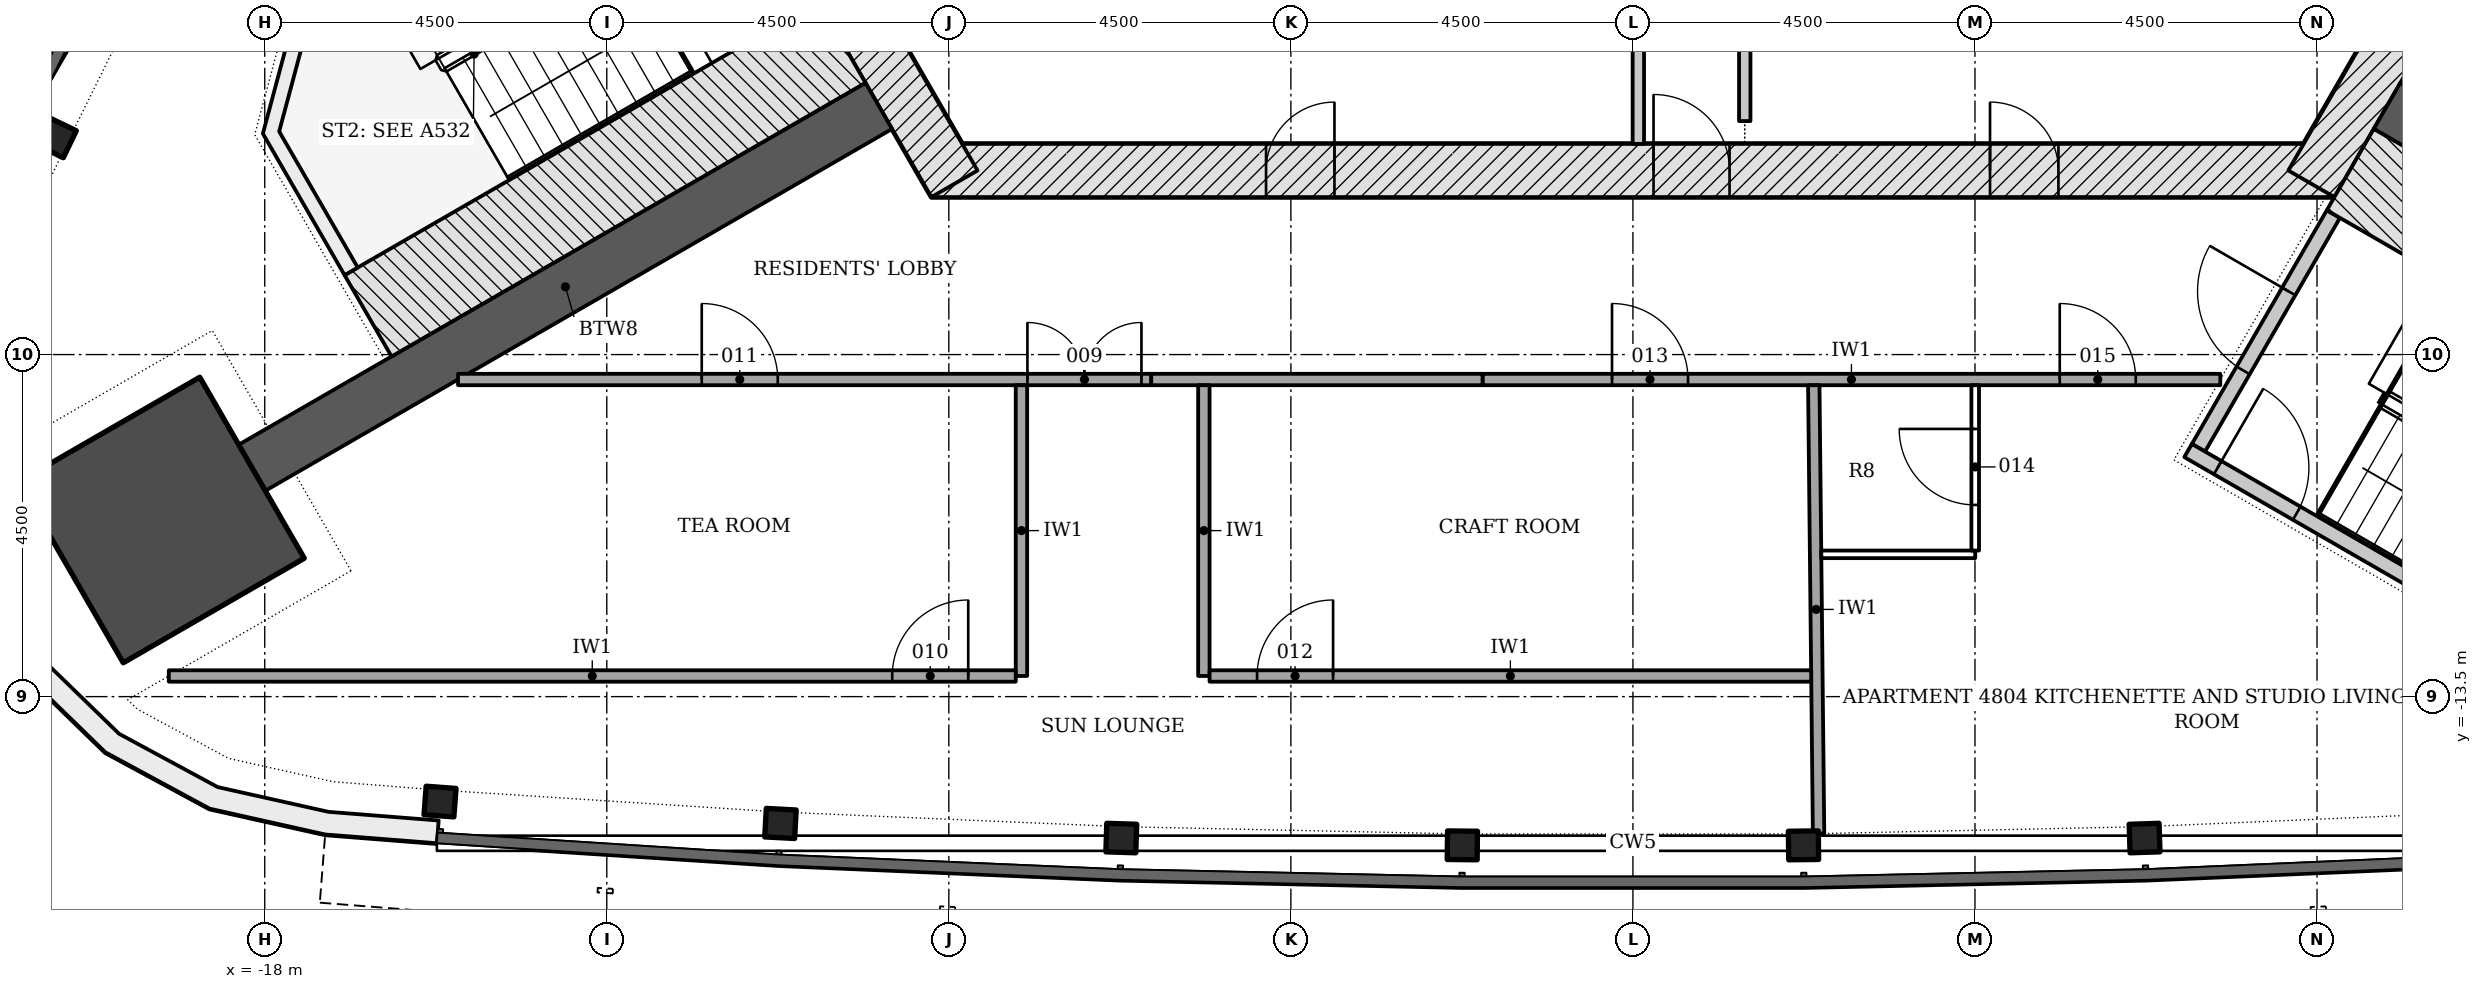
"""IFC4 building model, lengths in metres.
Left out: names, types, materials, properties, quantities, classifications, styles, units other than length and angle.
Written with IfcOpenShell. Run it as: python <this file> out.ifc"""

import sys

from ifc_helpers import new_model, si_unit, direction, frame, frame_2d, origin, origin_2d, place, context, subcontext, project, spatial, polyline, rectangle, i_section, outline, extrude, element, fill, save


model = new_model("IFC4")
c1 = context("Model", 3, precision=1e-05, world=origin(), true_north=direction((0.0, 1.0)))
c2 = subcontext(c1, "Body", "Model", "MODEL_VIEW")
j1 = project(units=[si_unit("LENGTHUNIT", "METRE"), si_unit("PLANEANGLEUNIT", "RADIAN")], contexts=[c1])
p1 = place(None, origin())
s1 = spatial("IfcSite", under=j1, at=p1, CompositionType="ELEMENT")
p2 = place(p1, origin())
s2 = spatial("IfcBuilding", under=s1, at=p2, CompositionType="ELEMENT")
p3 = place(p2, frame((0.0, 0.0, 188.7)))
s3 = spatial("IfcBuildingStorey", under=s2, at=p3, CompositionType="ELEMENT", Elevation=188.7)
p4 = place(p3, frame((-9.229, -6.578, -0.2), z_axis=(0.0, 0.0, 1.0), x_axis=(1.0, 0.0, 0.0)))
e1 = element("IfcWall", 1, at=p4, inside=s3, PredefinedType="SHEAR", context=c2, shape_type="SweptSolid", body=[
    extrude(rectangle(XDim=18.458, YDim=0.7, at=frame_2d((9.229, 0.0))), origin(), (0.0, 0.0, 1.0), 3.6),
])
p5 = place(p4, frame((9.5, 0.0, 0.2)))
e2 = element("IfcOpeningElement", 2, at=p5, cuts=e1, PredefinedType="OPENING", context=c2, shape_type="SweptSolid", body=[
    extrude(rectangle(XDim=1.0, YDim=2.1, at=frame_2d((0.5, 1.05))), frame((0.0, 0.36, 0.0), z_axis=(0.0, -1.0, 0.0), x_axis=(1.0, 0.0, 0.0)), (0.0, 0.0, 1.0), 0.72),
])
p6 = place(p4, frame((4.402, 0.0, 0.2)))
e3 = element("IfcOpeningElement", 3, at=p6, cuts=e1, PredefinedType="OPENING", context=c2, shape_type="SweptSolid", body=[
    extrude(rectangle(XDim=0.9, YDim=2.1, at=frame_2d((0.45, 1.05))), frame((0.0, 0.36, 0.0), z_axis=(0.0, -1.0, 0.0), x_axis=(1.0, 0.0, 0.0)), (0.0, 0.0, 1.0), 0.72),
])
p7 = place(p4, frame((13.927, 0.0, 0.2)))
e4 = element("IfcOpeningElement", 4, at=p7, cuts=e1, PredefinedType="OPENING", context=c2, shape_type="SweptSolid", body=[
    extrude(rectangle(XDim=0.9, YDim=2.1, at=frame_2d((0.45, 1.05))), frame((0.0, 0.36, 0.0), z_axis=(0.0, -1.0, 0.0), x_axis=(1.0, 0.0, 0.0)), (0.0, 0.0, 1.0), 0.72),
])
for number, where, z_axis, x_axis in (
    (5, (8.926, -6.753, -0.2), (0.0, 0.0, 1.0), (0.5, 0.866, 0.0)),
    (6, (-10.311, -4.353, -0.2), (0.0, 0.0, 1.0), (0.5, -0.866, 0.0)),
):
    element("IfcWall", number, at=place(p3, frame(where, z_axis=z_axis, x_axis=x_axis)), inside=s3, PredefinedType="SHEAR", context=c2, shape_type="SweptSolid", body=[
        extrude(rectangle(XDim=2.771, YDim=0.7, at=frame_2d((1.386, 0.0))), origin(), (0.0, 0.0, 1.0), 3.6),
    ])
for number, where, z_axis, x_axis in (
    (7, (-9.922, -5.728, -0.2), (0.0, 0.0, 1.0), (-0.866, -0.5, 0.0)),
    (8, (9.922, -5.728, -0.2), (0.0, 0.0, 1.0), (0.866, -0.5, 0.0)),
):
    element("IfcWall", number, at=place(p3, frame(where, z_axis=z_axis, x_axis=x_axis)), inside=s3, PredefinedType="SHEAR", context=c2, shape_type="SweptSolid", body=[
        extrude(rectangle(XDim=9.521, YDim=0.7, at=frame_2d((4.761, 0.0))), origin(), (0.0, 0.0, 1.0), 3.6),
    ])
p8 = place(p3, frame((-19.358, -11.177, -0.2), z_axis=(0.0, 0.0, 1.0), x_axis=(-0.866025403784, -0.5, 0.0)))
e9 = element("IfcColumn", 9, at=p8, inside=s3, PredefinedType="COLUMN", context=c2, shape_type="SweptSolid", body=[
    extrude(rectangle(XDim=2.75, YDim=2.75, at=origin_2d()), origin(), (0.0, 0.0, 1.0), 3.6),
])
for number, where, z_axis, x_axis in (
    (10, (-20.734, -6.151, -0.2), (0.0, 0.0, 1.0), (-0.434, -0.901, 0.0)),
    (11, (-15.694, -14.881, -0.2), (0.0, 0.0, 1.0), (0.997, -0.075, 0.0)),
    (12, (-11.215, -15.169, -0.2), (0.0, 0.0, 1.0), (0.999, -0.053, 0.0)),
    (13, (-6.731, -15.361, -0.2), (0.0, 0.0, 1.0), (0.999, -0.032, 0.0)),
    (14, (-2.244, -15.457, -0.2), (0.0, 0.0, 1.0), (1.0, -0.011, 0.0)),
    (15, (2.244, -15.457, -0.2), (0.0, 0.0, 1.0), (1.0, 0.011, 0.0)),
    (16, (6.731, -15.361, -0.2), (0.0, 0.0, 1.0), (0.999, 0.032, 0.0)),
):
    element("IfcColumn", number, at=place(p3, frame(where, z_axis=z_axis, x_axis=x_axis)), inside=s3, PredefinedType="COLUMN", context=c2, shape_type="SweptSolid", body=[
        extrude(i_section(OverallWidth=0.394, OverallDepth=0.376, WebThickness=0.017, FlangeThickness=0.028, FilletRadius=0.015, at=origin_2d()), origin(), (0.0, 0.0, 1.0), 3.6),
    ])
p9 = place(p3, origin())
e17 = element("IfcWall", 17, at=p9, inside=s3, PredefinedType="NOTDEFINED", context=c2, shape_type="SweptSolid", body=[
    extrude(outline(polyline([(-21.229, -5.913), (-21.865, -7.243), (-22.33, -8.73), (-22.374, -10.287), (-21.992, -11.798), (-21.213, -13.147), (-20.096, -14.233), (-18.726, -14.974), (-17.205, -15.313), (-15.735, -15.429), (-15.712, -15.13), (-17.16, -15.016), (-18.619, -14.69), (-19.917, -13.989), (-20.974, -12.961), (-21.711, -11.684), (-22.073, -10.254), (-22.032, -8.78), (-21.584, -7.353), (-20.959, -6.042), (-21.229, -5.913)])), origin(), (0.0, 0.0, 1.0), 3.3),
])
p10 = place(p3, frame((0.071, 4.272, 0.0), z_axis=(0.0, 0.0, 1.0), x_axis=(0.0, -1.0, 0.0)))
e18 = element("IfcWall", 18, at=p10, inside=s3, PredefinedType="PARTITIONING", context=c2, shape_type="SweptSolid", body=[
    extrude(rectangle(XDim=10.5, YDim=0.15, at=frame_2d((5.25, 0.0))), origin(), (0.0, 0.0, 1.0), 3.4),
])
p11 = place(p10, frame((3.101, 0.0, 0.0)))
e19 = element("IfcOpeningElement", 19, at=p11, cuts=e18, PredefinedType="OPENING", context=c2, shape_type="SweptSolid", body=[
    extrude(rectangle(XDim=0.9, YDim=2.1, at=frame_2d((0.45, 1.05))), frame((0.0, 0.085, 0.0), z_axis=(0.0, -1.0, 0.0), x_axis=(1.0, 0.0, 0.0)), (0.0, 0.0, 1.0), 0.17),
])
p12 = place(p3, frame((1.471, -5.928, 0.0), z_axis=(0.0, 0.0, 1.0), x_axis=(0.0, 1.0, 0.0)))
e20 = element("IfcWall", 20, at=p12, inside=s3, PredefinedType="PARTITIONING", context=c2, shape_type="SweptSolid", body=[
    extrude(rectangle(XDim=10.206, YDim=0.15, at=frame_2d((5.103, 0.0))), origin(), (0.0, 0.0, 1.0), 3.4),
])
p13 = place(p12, frame((6.15, 0.0, 0.0)))
e21 = element("IfcOpeningElement", 21, at=p13, cuts=e20, PredefinedType="OPENING", context=c2, shape_type="SweptSolid", body=[
    extrude(rectangle(XDim=1.0, YDim=2.1, at=frame_2d((0.5, 1.05))), frame((0.0, 0.085, 0.0), z_axis=(0.0, -1.0, 0.0), x_axis=(1.0, 0.0, 0.0)), (0.0, 0.0, 1.0), 0.17),
])
p14 = place(p3, frame((-10.406, -4.89, -0.2), z_axis=(0.0, 0.0, 1.0), x_axis=(-0.866018442252, -0.500012057535, 0.0)))
e22 = element("IfcWall", 22, at=p14, inside=s3, PredefinedType="SHEAR", context=c2, shape_type="SweptSolid", body=[
    extrude(rectangle(XDim=7.2, YDim=1.236, at=frame_2d((3.6, 0.0))), origin(), (0.0, 0.0, 1.0), 3.6),
])
p15 = place(p3, frame((0.0, 0.0, -0.2)))
e23 = element("IfcWall", 23, at=p15, inside=s3, PredefinedType="SHEAR", context=c2, shape_type="SweptSolid", body=[
    extrude(outline(polyline([(-17.439, -3.907), (-18.025, -6.093), (-16.95, -7.955), (-16.777, -7.855), (-17.81, -6.065), (-17.267, -4.039), (-17.339, -4.081), (-17.339, -4.081), (-17.339, -4.081), (-17.339, -4.081), (-17.339, -4.081), (-17.339, -4.081), (-17.339, -4.081), (-17.339, -4.081), (-17.339, -4.081), (-17.339, -4.081), (-17.339, -4.081), (-17.339, -4.081), (-17.339, -4.081), (-17.339, -4.081), (-17.339, -4.081), (-17.339, -4.081), (-17.339, -4.081), (-17.439, -3.907)])), origin(), (0.0, 0.0, 1.0), 3.6),
])
p16 = place(p3, frame((7.44, -10.226, -0.2), z_axis=(0.0, 0.0, 1.0), x_axis=(0.500022077904, 0.866012656725, 0.0)))
e24 = element("IfcWall", 24, at=p16, inside=s3, PredefinedType="SHEAR", context=c2, shape_type="SweptSolid", body=[
    extrude(rectangle(XDim=3.55, YDim=0.2, at=frame_2d((1.775, 0.0))), origin(), (0.0, 0.0, 1.0), 3.6),
])
p17 = place(p16, frame((1.175, 0.0, 0.2)))
e25 = element("IfcOpeningElement", 25, at=p17, cuts=e24, PredefinedType="OPENING", context=c2, shape_type="SweptSolid", body=[
    extrude(rectangle(XDim=1.2, YDim=2.1, at=frame_2d((0.6, 1.05))), frame((0.0, 0.11, 0.0), z_axis=(0.0, -1.0, 0.0), x_axis=(1.0, 0.0, 0.0)), (0.0, 0.0, 1.0), 0.22),
])
p18 = place(p3, frame((7.304, -10.262, -0.2), z_axis=(0.0, 0.0, 1.0), x_axis=(0.866026594901, -0.49999793692, 0.0)))
e26 = element("IfcWall", 26, at=p18, inside=s3, PredefinedType="SHEAR", context=c2, shape_type="SweptSolid", body=[
    extrude(rectangle(XDim=5.6, YDim=0.2, at=frame_2d((2.8, 0.0))), origin(), (0.0, 0.0, 1.0), 3.6),
])
p19 = place(p18, frame((0.45, 0.0, 0.2)))
e27 = element("IfcOpeningElement", 27, at=p19, cuts=e26, PredefinedType="OPENING", context=c2, shape_type="SweptSolid", body=[
    extrude(rectangle(XDim=1.2, YDim=2.1, at=frame_2d((0.6, 1.05))), frame((0.0, 0.11, 0.0), z_axis=(0.0, -1.0, 0.0), x_axis=(1.0, 0.0, 0.0)), (0.0, 0.0, 1.0), 0.22),
])
p20 = place(p3, frame((9.438, -6.566, -0.2), z_axis=(0.0, 0.0, 1.0), x_axis=(0.866026919366, -0.499997374926, 0.0)))
e28 = element("IfcWall", 28, at=p20, inside=s3, PredefinedType="SHEAR", context=c2, shape_type="SweptSolid", body=[
    extrude(rectangle(XDim=7.2, YDim=1.236, at=frame_2d((3.6, 0.0))), origin(), (0.0, 0.0, 1.0), 3.6),
])
p21 = place(p3, frame((-15.457, -9.328, 0.0), z_axis=(0.0, 0.0, 1.0), x_axis=(1.0, 0.0, 0.0)))
e29 = element("IfcWall", 29, at=p21, inside=s3, PredefinedType="PARTITIONING", context=c2, shape_type="SweptSolid", body=[
    extrude(rectangle(XDim=9.12, YDim=0.15, at=frame_2d((4.56, 0.0))), origin(), (0.0, 0.0, 1.0), 2.852),
])
p22 = place(p21, frame((7.491, 0.0, 0.0)))
e30 = element("IfcOpeningElement", 30, at=p22, cuts=e29, PredefinedType="OPENING", context=c2, shape_type="SweptSolid", body=[
    extrude(rectangle(XDim=1.5, YDim=2.1, at=frame_2d((0.75, 1.05))), frame((0.0, 0.085, 0.0), z_axis=(0.0, -1.0, 0.0), x_axis=(1.0, 0.0, 0.0)), (0.0, 0.0, 1.0), 0.17),
])
p23 = place(p21, frame((3.206, 0.0, 0.0)))
e31 = element("IfcOpeningElement", 31, at=p23, cuts=e29, PredefinedType="OPENING", context=c2, shape_type="SweptSolid", body=[
    extrude(rectangle(XDim=1.0, YDim=2.1, at=frame_2d((0.5, 1.05))), frame((0.0, 0.085, 0.0), z_axis=(0.0, -1.0, 0.0), x_axis=(1.0, 0.0, 0.0)), (0.0, 0.0, 1.0), 0.17),
])
p24 = place(p3, frame((-1.979, -9.328, 0.0), z_axis=(0.0, 0.0, 1.0), x_axis=(1.0, 0.0, 0.0)))
e32 = element("IfcWall", 32, at=p24, inside=s3, PredefinedType="PARTITIONING", context=c2, shape_type="SweptSolid", body=[
    extrude(rectangle(XDim=9.706, YDim=0.15, at=frame_2d((4.853, 0.0))), origin(), (0.0, 0.0, 1.0), 2.852),
])
p25 = place(p24, frame((1.703, 0.0, 0.0)))
e33 = element("IfcOpeningElement", 33, at=p25, cuts=e32, PredefinedType="OPENING", context=c2, shape_type="SweptSolid", body=[
    extrude(rectangle(XDim=1.0, YDim=2.1, at=frame_2d((0.5, 1.05))), frame((0.0, 0.085, 0.0), z_axis=(0.0, -1.0, 0.0), x_axis=(1.0, 0.0, 0.0)), (0.0, 0.0, 1.0), 0.17),
])
p26 = place(p24, frame((7.594, 0.0, 0.0)))
e34 = element("IfcOpeningElement", 34, at=p26, cuts=e32, PredefinedType="OPENING", context=c2, shape_type="SweptSolid", body=[
    extrude(rectangle(XDim=1.0, YDim=2.1, at=frame_2d((0.5, 1.05))), frame((0.0, 0.085, 0.0), z_axis=(0.0, -1.0, 0.0), x_axis=(1.0, 0.0, 0.0)), (0.0, 0.0, 1.0), 0.17),
])
p27 = place(p3, frame((-6.337, -9.328, 0.0), z_axis=(0.0, 0.0, 1.0), x_axis=(1.0, 0.0, 0.0)))
e35 = element("IfcWall", 35, at=p27, inside=s3, PredefinedType="PARTITIONING", context=c2, shape_type="SweptSolid", body=[
    extrude(rectangle(XDim=4.359, YDim=0.15, at=frame_2d((2.179, 0.0))), origin(), (0.0, 0.0, 1.0), 2.852),
])
p28 = place(p3, frame((2.442, -15.302, 0.0), z_axis=(0.0, 0.0, 1.0), x_axis=(-0.01067687349, 0.999943000562, 0.0)))
e36 = element("IfcWall", 36, at=p28, inside=s3, PredefinedType="PARTITIONING", context=c2, shape_type="SweptSolid", body=[
    extrude(rectangle(XDim=5.899, YDim=0.15, at=frame_2d((2.95, 0.0))), origin(), (0.0, 0.0, 1.0), 2.461),
])
for number, where, z_axis, x_axis in (
    (37, (-8.045, -9.403, 0.0), (0.0, 0.0, 1.0), (0.0, -1.0, 0.0)),
    (38, (-5.645, -9.403, 0.0), (0.0, 0.0, 1.0), (0.0, -1.0, 0.0)),
):
    element("IfcWall", number, at=place(p3, frame(where, z_axis=z_axis, x_axis=x_axis)), inside=s3, PredefinedType="PARTITIONING", context=c2, shape_type="SweptSolid", body=[
        extrude(rectangle(XDim=3.825, YDim=0.15, at=frame_2d((1.913, 0.0))), origin(), (0.0, 0.0, 1.0), 3.4),
    ])
p29 = place(p3, frame((-19.262, -13.229, 0.0), z_axis=(0.0, 0.0, 1.0), x_axis=(1.0, 0.0, 0.0)))
e39 = element("IfcWall", 39, at=p29, inside=s3, PredefinedType="PARTITIONING", context=c2, shape_type="SweptSolid", body=[
    extrude(rectangle(XDim=11.143, YDim=0.15, at=frame_2d((5.571, 0.0))), origin(), (0.0, 0.0, 1.0), 2.852),
])
p30 = place(p29, frame((9.518, 0.0, 0.0)))
e40 = element("IfcOpeningElement", 40, at=p30, cuts=e39, PredefinedType="OPENING", context=c2, shape_type="SweptSolid", body=[
    extrude(rectangle(XDim=1.0, YDim=2.1, at=frame_2d((0.5, 1.05))), frame((0.0, 0.085, 0.0), z_axis=(0.0, -1.0, 0.0), x_axis=(1.0, 0.0, 0.0)), (0.0, 0.0, 1.0), 0.17),
])
p31 = place(p3, frame((-5.57, -13.229, 0.0), z_axis=(0.0, 0.0, 1.0), x_axis=(1.0, 0.0, 0.0)))
e41 = element("IfcWall", 41, at=p31, inside=s3, PredefinedType="PARTITIONING", context=c2, shape_type="SweptSolid", body=[
    extrude(rectangle(XDim=7.915, YDim=0.15, at=frame_2d((3.958, 0.0))), origin(), (0.0, 0.0, 1.0), 2.852),
])
p32 = place(p31, frame((0.625, 0.0, 0.0)))
e42 = element("IfcOpeningElement", 42, at=p32, cuts=e41, PredefinedType="OPENING", context=c2, shape_type="SweptSolid", body=[
    extrude(rectangle(XDim=1.0, YDim=2.1, at=frame_2d((0.5, 1.05))), frame((0.0, 0.085, 0.0), z_axis=(0.0, -1.0, 0.0), x_axis=(1.0, 0.0, 0.0)), (0.0, 0.0, 1.0), 0.17),
])
p33 = place(p3, frame((2.478, -11.628, 0.0), z_axis=(0.0, 0.0, 1.0), x_axis=(1.0, 0.0, 0.0)))
e43 = element("IfcWall", 43, at=p33, inside=s3, PredefinedType="PARTITIONING", context=c2, shape_type="SweptSolid", body=[
    extrude(rectangle(XDim=2.025, YDim=0.1, at=frame_2d((1.013, 0.0))), origin(), (0.0, 0.0, 1.0), 2.852),
])
p34 = place(p3, frame((4.503, -11.578, 0.0), z_axis=(0.0, 0.0, 1.0), x_axis=(0.0, 1.0, 0.0)))
e44 = element("IfcWall", 44, at=p34, inside=s3, PredefinedType="PARTITIONING", context=c2, shape_type="SweptSolid", body=[
    extrude(rectangle(XDim=2.175, YDim=0.1, at=frame_2d((1.087, 0.0))), origin(), (0.0, 0.0, 1.0), 2.852),
])
p35 = place(p34, frame((0.6, 0.0, 0.0)))
e45 = element("IfcOpeningElement", 45, at=p35, cuts=e44, PredefinedType="OPENING", context=c2, shape_type="SweptSolid", body=[
    extrude(rectangle(XDim=1.0, YDim=2.1, at=frame_2d((0.5, 1.05))), frame((0.0, 0.06, 0.0), z_axis=(0.0, -1.0, 0.0), x_axis=(1.0, 0.0, 0.0)), (0.0, 0.0, 1.0), 0.12),
])
p36 = place(p5, origin())
e46 = element("IfcDoor", 46, at=p36, inside=s3, OperationType="SINGLE_SWING_LEFT", PredefinedType="DOOR", context=c2, shape_type="SweptSolid", body=[
    extrude(rectangle(XDim=1.0, YDim=2.1, at=frame_2d((0.5, 1.05))), frame((0.0, 0.075, 0.0), z_axis=(0.0, -1.0, 0.0), x_axis=(1.0, 0.0, 0.0)), (0.0, 0.0, 1.0), 0.15),
])
fill(e2, e46)
p37 = place(p6, origin())
e47 = element("IfcDoor", 47, at=p37, inside=s3, OperationType="SINGLE_SWING_RIGHT", PredefinedType="DOOR", context=c2, shape_type="SweptSolid", body=[
    extrude(rectangle(XDim=0.9, YDim=2.1, at=frame_2d((0.45, 1.05))), frame((0.0, 0.075, 0.0), z_axis=(0.0, -1.0, 0.0), x_axis=(1.0, 0.0, 0.0)), (0.0, 0.0, 1.0), 0.15),
])
fill(e3, e47)
p38 = place(p7, origin())
e48 = element("IfcDoor", 48, at=p38, inside=s3, OperationType="SINGLE_SWING_LEFT", PredefinedType="DOOR", context=c2, shape_type="SweptSolid", body=[
    extrude(rectangle(XDim=0.9, YDim=2.1, at=frame_2d((0.45, 1.05))), frame((0.0, 0.075, 0.0), z_axis=(0.0, -1.0, 0.0), x_axis=(1.0, 0.0, 0.0)), (0.0, 0.0, 1.0), 0.15),
])
fill(e4, e48)
p39 = place(p17, origin())
e49 = element("IfcDoor", 49, at=p39, inside=s3, OperationType="SINGLE_SWING_RIGHT", PredefinedType="DOOR", context=c2, shape_type="SweptSolid", body=[
    extrude(rectangle(XDim=1.2, YDim=2.1, at=frame_2d((0.6, 1.05))), frame((0.0, 0.025, 0.0), z_axis=(0.0, -1.0, 0.0), x_axis=(1.0, 0.0, 0.0)), (0.0, 0.0, 1.0), 0.05),
])
fill(e25, e49)
p40 = place(p19, origin())
e50 = element("IfcDoor", 50, at=p40, inside=s3, OperationType="SINGLE_SWING_LEFT", PredefinedType="DOOR", context=c2, shape_type="SweptSolid", body=[
    extrude(rectangle(XDim=1.2, YDim=2.1, at=frame_2d((0.6, 1.05))), frame((0.0, 0.025, 0.0), z_axis=(0.0, -1.0, 0.0), x_axis=(1.0, 0.0, 0.0)), (0.0, 0.0, 1.0), 0.05),
])
fill(e27, e50)
p41 = place(p22, origin())
e51 = element("IfcDoor", 51, at=p41, inside=s3, OperationType="DOUBLE_DOOR_SINGLE_SWING", PredefinedType="DOOR", context=c2, shape_type="SweptSolid", body=[
    extrude(rectangle(XDim=1.5, YDim=2.1, at=frame_2d((0.75, 1.05))), frame((0.0, 0.025, 0.0), z_axis=(0.0, -1.0, 0.0), x_axis=(1.0, 0.0, 0.0)), (0.0, 0.0, 1.0), 0.05),
])
fill(e30, e51)
p42 = place(p30, origin())
e52 = element("IfcDoor", 52, at=p42, inside=s3, OperationType="SINGLE_SWING_RIGHT", PredefinedType="DOOR", context=c2, shape_type="SweptSolid", body=[
    extrude(rectangle(XDim=1.0, YDim=2.1, at=frame_2d((0.5, 1.05))), frame((0.0, 0.025, 0.0), z_axis=(0.0, -1.0, 0.0), x_axis=(1.0, 0.0, 0.0)), (0.0, 0.0, 1.0), 0.05),
])
fill(e40, e52)
p43 = place(p23, origin())
e53 = element("IfcDoor", 53, at=p43, inside=s3, OperationType="SINGLE_SWING_LEFT", PredefinedType="DOOR", context=c2, shape_type="SweptSolid", body=[
    extrude(rectangle(XDim=1.0, YDim=2.1, at=frame_2d((0.5, 1.05))), frame((0.0, 0.025, 0.0), z_axis=(0.0, -1.0, 0.0), x_axis=(1.0, 0.0, 0.0)), (0.0, 0.0, 1.0), 0.05),
])
fill(e31, e53)
p44 = place(p32, origin())
e54 = element("IfcDoor", 54, at=p44, inside=s3, OperationType="SINGLE_SWING_RIGHT", PredefinedType="DOOR", context=c2, shape_type="SweptSolid", body=[
    extrude(rectangle(XDim=1.0, YDim=2.1, at=frame_2d((0.5, 1.05))), frame((0.0, 0.025, 0.0), z_axis=(0.0, -1.0, 0.0), x_axis=(1.0, 0.0, 0.0)), (0.0, 0.0, 1.0), 0.05),
])
fill(e42, e54)
p45 = place(p25, origin())
e55 = element("IfcDoor", 55, at=p45, inside=s3, OperationType="SINGLE_SWING_LEFT", PredefinedType="DOOR", context=c2, shape_type="SweptSolid", body=[
    extrude(rectangle(XDim=1.0, YDim=2.1, at=frame_2d((0.5, 1.05))), frame((0.0, 0.025, 0.0), z_axis=(0.0, -1.0, 0.0), x_axis=(1.0, 0.0, 0.0)), (0.0, 0.0, 1.0), 0.05),
])
fill(e33, e55)
p46 = place(p35, origin())
e56 = element("IfcDoor", 56, at=p46, inside=s3, OperationType="SINGLE_SWING_RIGHT", PredefinedType="DOOR", context=c2, shape_type="SweptSolid", body=[
    extrude(rectangle(XDim=1.0, YDim=2.1, at=frame_2d((0.5, 1.05))), frame((0.0, 0.025, 0.0), z_axis=(0.0, -1.0, 0.0), x_axis=(1.0, 0.0, 0.0)), (0.0, 0.0, 1.0), 0.05),
])
fill(e45, e56)
p47 = place(p26, origin())
e57 = element("IfcDoor", 57, at=p47, inside=s3, OperationType="SINGLE_SWING_LEFT", PredefinedType="DOOR", context=c2, shape_type="SweptSolid", body=[
    extrude(rectangle(XDim=1.0, YDim=2.1, at=frame_2d((0.5, 1.05))), frame((0.0, 0.025, 0.0), z_axis=(0.0, -1.0, 0.0), x_axis=(1.0, 0.0, 0.0)), (0.0, 0.0, 1.0), 0.05),
])
fill(e34, e57)
save(model, sys.argv[1])
